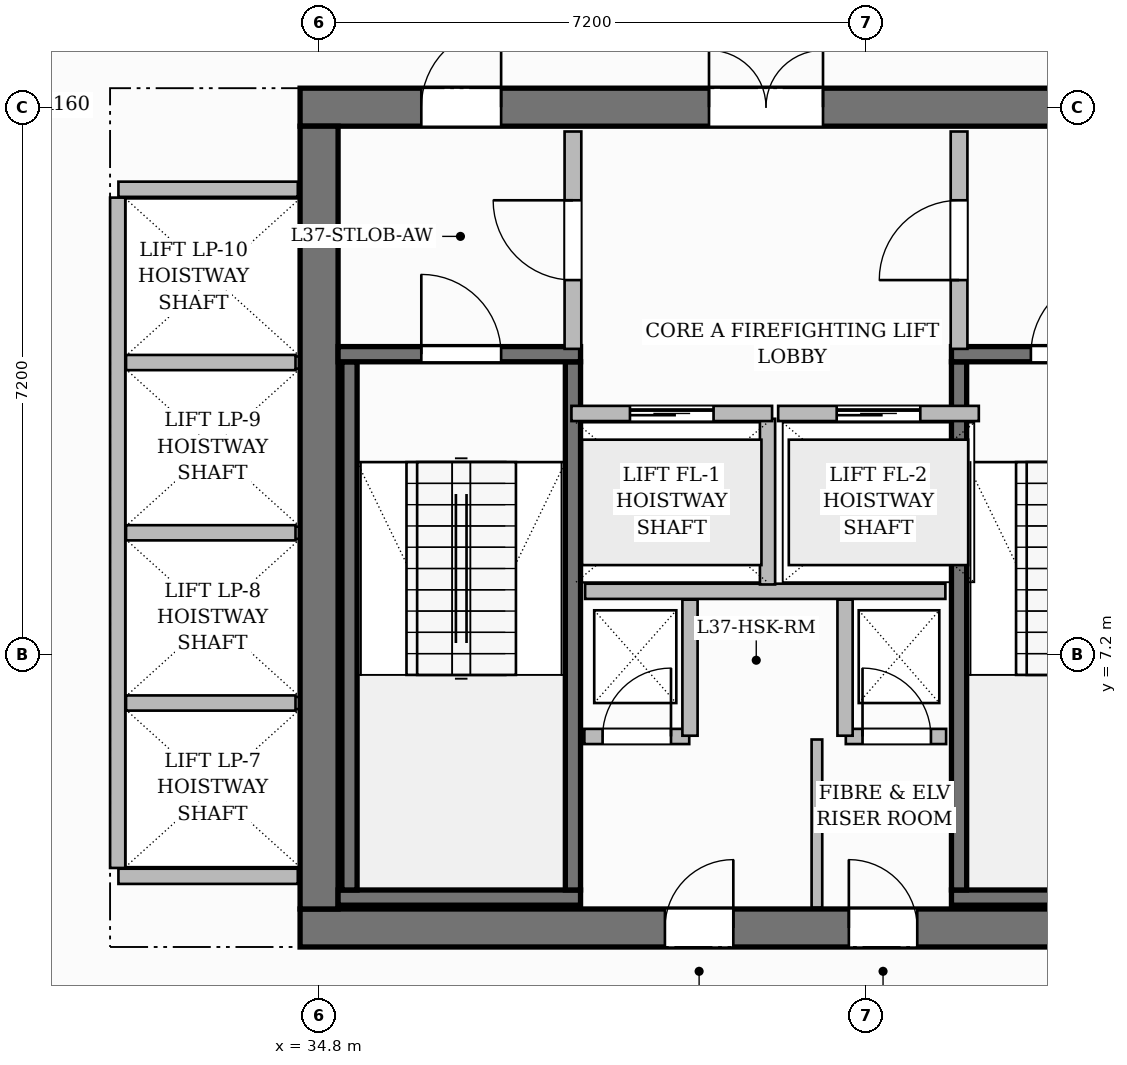
"""IFC4 building model, lengths in metres.
Left out: names, types, materials, properties, quantities, classifications, styles, units other than length and angle.
Written with IfcOpenShell. Run it as: python <this file> out.ifc"""

import sys

from ifc_helpers import new_model, si_unit, direction, frame, frame_2d, origin, place, context, subcontext, project, spatial, rectangle, extrude, source, transform, mapped, element, fill, save


model = new_model("IFC4")
c1 = context("Model", 3, precision=1e-05, world=origin(), true_north=direction((0.0, 1.0)))
c2 = subcontext(c1, "Body", "Model", "MODEL_VIEW")
j1 = project(units=[si_unit("LENGTHUNIT", "METRE"), si_unit("PLANEANGLEUNIT", "RADIAN")], contexts=[c1])
p1 = place(None, origin())
s1 = spatial("IfcSite", under=j1, at=p1, CompositionType="ELEMENT")
p2 = place(p1, origin())
s2 = spatial("IfcBuilding", under=s1, at=p2, CompositionType="ELEMENT")
p3 = place(p2, frame((0.0, 0.0, 150.3)))
s3 = spatial("IfcBuildingStorey", under=s2, at=p3, CompositionType="ELEMENT", Elevation=150.3)
p4 = place(p3, frame((34.55, 3.6, 0.0), z_axis=(0.0, 0.0, 1.0), x_axis=(1.0, 0.0, 0.0)))
e1 = element("IfcWall", 1, at=p4, inside=s3, PredefinedType="SHEAR", context=c2, shape_type="SweptSolid", body=[
    extrude(rectangle(XDim=15.5, YDim=0.5, at=frame_2d((7.75, 0.0))), origin(), (0.0, 0.0, 1.0), 3.85),
])
p5 = place(p4, frame((4.8, 0.0, 0.0)))
e2 = element("IfcOpeningElement", 2, at=p5, cuts=e1, PredefinedType="OPENING", context=c2, shape_type="SweptSolid", body=[
    extrude(rectangle(XDim=0.9, YDim=2.1, at=frame_2d((0.45, 1.05))), frame((0.0, 0.26, 0.0), z_axis=(0.0, -1.0, 0.0), x_axis=(1.0, 0.0, 0.0)), (0.0, 0.0, 1.0), 0.52),
])
p6 = place(p4, frame((7.22, 0.0, 0.0)))
e3 = element("IfcOpeningElement", 3, at=p6, cuts=e1, PredefinedType="OPENING", context=c2, shape_type="SweptSolid", body=[
    extrude(rectangle(XDim=0.9, YDim=2.1, at=frame_2d((0.45, 1.05))), frame((0.0, 0.26, 0.0), z_axis=(0.0, -1.0, 0.0), x_axis=(1.0, 0.0, 0.0)), (0.0, 0.0, 1.0), 0.52),
])
p7 = place(p3, frame((34.55, 14.4, 0.0), z_axis=(0.0, 0.0, 1.0), x_axis=(1.0, 0.0, 0.0)))
e4 = element("IfcWall", 4, at=p7, inside=s3, PredefinedType="SHEAR", context=c2, shape_type="SweptSolid", body=[
    extrude(rectangle(XDim=15.5, YDim=0.5, at=frame_2d((7.75, 0.0))), origin(), (0.0, 0.0, 1.0), 3.85),
])
p8 = place(p7, frame((5.38, 0.0, 0.0)))
e5 = element("IfcOpeningElement", 5, at=p8, cuts=e4, PredefinedType="OPENING", context=c2, shape_type="SweptSolid", body=[
    extrude(rectangle(XDim=1.5, YDim=2.2, at=frame_2d((0.75, 1.1))), frame((0.0, 0.26, 0.0), z_axis=(0.0, -1.0, 0.0), x_axis=(1.0, 0.0, 0.0)), (0.0, 0.0, 1.0), 0.52),
])
p9 = place(p7, frame((1.595, 0.0, 0.0)))
e6 = element("IfcOpeningElement", 6, at=p9, cuts=e4, PredefinedType="OPENING", context=c2, shape_type="SweptSolid", body=[
    extrude(rectangle(XDim=1.05, YDim=2.15, at=frame_2d((0.525, 1.075))), frame((0.0, 0.26, 0.0), z_axis=(0.0, -1.0, 0.0), x_axis=(1.0, 0.0, 0.0)), (0.0, 0.0, 1.0), 0.52),
])
p10 = place(p7, frame((11.225, 0.0, 0.0)))
e7 = element("IfcOpeningElement", 7, at=p10, cuts=e4, PredefinedType="OPENING", context=c2, shape_type="SweptSolid", body=[
    extrude(rectangle(XDim=1.05, YDim=2.15, at=frame_2d((0.525, 1.075))), frame((0.0, 0.26, 0.0), z_axis=(0.0, -1.0, 0.0), x_axis=(1.0, 0.0, 0.0)), (0.0, 0.0, 1.0), 0.52),
])
p11 = place(p3, frame((34.8, 3.85, 0.0), z_axis=(0.0, 0.0, 1.0), x_axis=(0.0, 1.0, 0.0)))
e8 = element("IfcWall", 8, at=p11, inside=s3, PredefinedType="SHEAR", context=c2, shape_type="SweptSolid", body=[
    extrude(rectangle(XDim=10.3, YDim=0.5, at=frame_2d((5.15, 0.0))), origin(), (0.0, 0.0, 1.0), 3.85),
])
p12 = place(p3, frame((35.05, 4.0, 0.0), z_axis=(0.0, 0.0, 1.0), x_axis=(1.0, 0.0, 0.0)))
e9 = element("IfcWall", 9, at=p12, inside=s3, PredefinedType="SHEAR", context=c2, shape_type="SweptSolid", body=[
    extrude(rectangle(XDim=3.19, YDim=0.2, at=frame_2d((1.595, 0.0))), origin(), (0.0, 0.0, 1.0), 3.85),
])
for number, where, z_axis, x_axis in (
    (10, (35.2, 4.1, 0.0), (0.0, 0.0, 1.0), (0.0, 1.0, 0.0)),
    (11, (38.14, 4.1, 0.0), (0.0, 0.0, 1.0), (0.0, 1.0, 0.0)),
):
    element("IfcWall", number, at=place(p3, frame(where, z_axis=z_axis, x_axis=x_axis)), inside=s3, PredefinedType="SHEAR", context=c2, shape_type="SweptSolid", body=[
        extrude(rectangle(XDim=6.95, YDim=0.2, at=frame_2d((3.475, 0.0))), origin(), (0.0, 0.0, 1.0), 3.85),
    ])
p13 = place(p3, frame((35.05, 11.15, 0.0), z_axis=(0.0, 0.0, 1.0), x_axis=(1.0, 0.0, 0.0)))
e12 = element("IfcWall", 12, at=p13, inside=s3, PredefinedType="SHEAR", context=c2, shape_type="SweptSolid", body=[
    extrude(rectangle(XDim=3.19, YDim=0.2, at=frame_2d((1.595, 0.0))), origin(), (0.0, 0.0, 1.0), 3.85),
])
p14 = place(p13, frame((1.095, 0.0, 0.0)))
e13 = element("IfcOpeningElement", 13, at=p14, cuts=e12, PredefinedType="OPENING", context=c2, shape_type="SweptSolid", body=[
    extrude(rectangle(XDim=1.05, YDim=2.2, at=frame_2d((0.525, 1.1))), frame((0.0, 0.11, 0.0), z_axis=(0.0, -1.0, 0.0), x_axis=(1.0, 0.0, 0.0)), (0.0, 0.0, 1.0), 0.22),
])
p15 = place(p3, frame((43.12, 4.0, 0.0), z_axis=(0.0, 0.0, 1.0), x_axis=(1.0, 0.0, 0.0)))
e14 = element("IfcWall", 14, at=p15, inside=s3, PredefinedType="SHEAR", context=c2, shape_type="SweptSolid", body=[
    extrude(rectangle(XDim=6.43, YDim=0.2, at=frame_2d((3.215, 0.0))), origin(), (0.0, 0.0, 1.0), 3.85),
])
p16 = place(p3, frame((43.22, 4.1, 0.0), z_axis=(0.0, 0.0, 1.0), x_axis=(0.0, 1.0, 0.0)))
e15 = element("IfcWall", 15, at=p16, inside=s3, PredefinedType="SHEAR", context=c2, shape_type="SweptSolid", body=[
    extrude(rectangle(XDim=6.95, YDim=0.2, at=frame_2d((3.475, 0.0))), origin(), (0.0, 0.0, 1.0), 3.85),
])
p17 = place(p3, frame((43.12, 11.15, 0.0), z_axis=(0.0, 0.0, 1.0), x_axis=(1.0, 0.0, 0.0)))
e16 = element("IfcWall", 16, at=p17, inside=s3, PredefinedType="SHEAR", context=c2, shape_type="SweptSolid", body=[
    extrude(rectangle(XDim=6.43, YDim=0.2, at=frame_2d((3.215, 0.0))), origin(), (0.0, 0.0, 1.0), 3.85),
])
p18 = place(p17, frame((1.045, 0.0, 0.0)))
e17 = element("IfcOpeningElement", 17, at=p18, cuts=e16, PredefinedType="OPENING", context=c2, shape_type="SweptSolid", body=[
    extrude(rectangle(XDim=1.05, YDim=2.2, at=frame_2d((0.525, 1.1))), frame((0.0, 0.11, 0.0), z_axis=(0.0, -1.0, 0.0), x_axis=(1.0, 0.0, 0.0)), (0.0, 0.0, 1.0), 0.22),
])
p19 = place(p17, frame((4.125, 0.0, 0.0)))
e18 = element("IfcOpeningElement", 18, at=p19, cuts=e16, PredefinedType="OPENING", context=c2, shape_type="SweptSolid", body=[
    extrude(rectangle(XDim=1.05, YDim=2.2, at=frame_2d((0.525, 1.1))), frame((0.0, 0.11, 0.0), z_axis=(0.0, -1.0, 0.0), x_axis=(1.0, 0.0, 0.0)), (0.0, 0.0, 1.0), 0.22),
])
p20 = place(p3, frame((38.3, 8.03, 0.0), z_axis=(0.0, 0.0, 1.0), x_axis=(1.0, 0.0, 0.0)))
e19 = element("IfcWall", 19, at=p20, inside=s3, PredefinedType="PARTITIONING", context=c2, shape_type="SweptSolid", body=[
    extrude(rectangle(XDim=4.74, YDim=0.2, at=frame_2d((2.37, 0.0))), origin(), (0.0, 0.0, 1.0), 3.6),
])
p21 = place(p3, frame((40.7, 8.12, 0.0), z_axis=(0.0, 0.0, 1.0), x_axis=(0.0, 1.0, 0.0)))
e20 = element("IfcWall", 20, at=p21, inside=s3, PredefinedType="PARTITIONING", context=c2, shape_type="SweptSolid", body=[
    extrude(rectangle(XDim=2.18, YDim=0.2, at=frame_2d((1.09, 0.0))), origin(), (0.0, 0.0, 1.0), 3.6),
])
p22 = place(p3, frame((38.14, 11.22, 0.0), z_axis=(0.0, 0.0, 1.0), x_axis=(0.0, 1.0, 0.0)))
e21 = element("IfcWall", 21, at=p22, inside=s3, PredefinedType="PARTITIONING", context=c2, shape_type="SweptSolid", body=[
    extrude(rectangle(XDim=2.86, YDim=0.22, at=frame_2d((1.43, 0.0))), origin(), (0.0, 0.0, 1.0), 3.6),
])
p23 = place(p22, frame((0.905, 0.0, 0.0)))
e22 = element("IfcOpeningElement", 22, at=p23, cuts=e21, PredefinedType="OPENING", context=c2, shape_type="SweptSolid", body=[
    extrude(rectangle(XDim=1.05, YDim=2.15, at=frame_2d((0.525, 1.075))), frame((0.0, 0.12, 0.0), z_axis=(0.0, -1.0, 0.0), x_axis=(1.0, 0.0, 0.0)), (0.0, 0.0, 1.0), 0.24),
])
p24 = place(p3, frame((43.22, 11.22, 0.0), z_axis=(0.0, 0.0, 1.0), x_axis=(0.0, 1.0, 0.0)))
e23 = element("IfcWall", 23, at=p24, inside=s3, PredefinedType="PARTITIONING", context=c2, shape_type="SweptSolid", body=[
    extrude(rectangle(XDim=2.86, YDim=0.22, at=frame_2d((1.43, 0.0))), origin(), (0.0, 0.0, 1.0), 3.6),
])
p25 = place(p24, frame((0.905, 0.0, 0.0)))
e24 = element("IfcOpeningElement", 24, at=p25, cuts=e23, PredefinedType="OPENING", context=c2, shape_type="SweptSolid", body=[
    extrude(rectangle(XDim=1.05, YDim=2.15, at=frame_2d((0.525, 1.075))), frame((0.0, 0.12, 0.0), z_axis=(0.0, -1.0, 0.0), x_axis=(1.0, 0.0, 0.0)), (0.0, 0.0, 1.0), 0.24),
])
p26 = place(p3, frame((38.29, 6.12, 0.0), z_axis=(0.0, 0.0, 1.0), x_axis=(1.0, 0.0, 0.0)))
e25 = element("IfcWall", 25, at=p26, inside=s3, PredefinedType="PARTITIONING", context=c2, shape_type="SweptSolid", body=[
    extrude(rectangle(XDim=1.38, YDim=0.2, at=frame_2d((0.69, 0.0))), origin(), (0.0, 0.0, 1.0), 3.6),
])
p27 = place(p26, frame((0.24, 0.0, 0.0)))
e26 = element("IfcOpeningElement", 26, at=p27, cuts=e25, PredefinedType="OPENING", context=c2, shape_type="SweptSolid", body=[
    extrude(rectangle(XDim=0.9, YDim=2.1, at=frame_2d((0.45, 1.05))), frame((0.0, 0.11, 0.0), z_axis=(0.0, -1.0, 0.0), x_axis=(1.0, 0.0, 0.0)), (0.0, 0.0, 1.0), 0.22),
])
p28 = place(p3, frame((39.68, 6.13, 0.0), z_axis=(0.0, 0.0, 1.0), x_axis=(0.0, 1.0, 0.0)))
e27 = element("IfcWall", 27, at=p28, inside=s3, PredefinedType="PARTITIONING", context=c2, shape_type="SweptSolid", body=[
    extrude(rectangle(XDim=1.79, YDim=0.2, at=frame_2d((0.895, 0.0))), origin(), (0.0, 0.0, 1.0), 3.6),
])
p29 = place(p3, frame((41.73, 6.12, 0.0), z_axis=(0.0, 0.0, 1.0), x_axis=(1.0, 0.0, 0.0)))
e28 = element("IfcWall", 28, at=p29, inside=s3, PredefinedType="PARTITIONING", context=c2, shape_type="SweptSolid", body=[
    extrude(rectangle(XDim=1.32, YDim=0.2, at=frame_2d((0.66, 0.0))), origin(), (0.0, 0.0, 1.0), 3.6),
])
p30 = place(p29, frame((0.22, 0.0, 0.0)))
e29 = element("IfcOpeningElement", 29, at=p30, cuts=e28, PredefinedType="OPENING", context=c2, shape_type="SweptSolid", body=[
    extrude(rectangle(XDim=0.9, YDim=2.1, at=frame_2d((0.45, 1.05))), frame((0.0, 0.11, 0.0), z_axis=(0.0, -1.0, 0.0), x_axis=(1.0, 0.0, 0.0)), (0.0, 0.0, 1.0), 0.22),
])
p31 = place(p3, frame((41.72, 6.13, 0.0), z_axis=(0.0, 0.0, 1.0), x_axis=(0.0, 1.0, 0.0)))
e30 = element("IfcWall", 30, at=p31, inside=s3, PredefinedType="PARTITIONING", context=c2, shape_type="SweptSolid", body=[
    extrude(rectangle(XDim=1.79, YDim=0.2, at=frame_2d((0.895, 0.0))), origin(), (0.0, 0.0, 1.0), 3.6),
])
p32 = place(p3, frame((41.35, 3.87, 0.0), z_axis=(0.0, 0.0, 1.0), x_axis=(0.0, 1.0, 0.0)))
e31 = element("IfcWall", 31, at=p32, inside=s3, PredefinedType="PARTITIONING", context=c2, shape_type="SweptSolid", body=[
    extrude(rectangle(XDim=2.21, YDim=0.14, at=frame_2d((1.105, 0.0))), origin(), (0.0, 0.0, 1.0), 3.6),
])
for number, where, z_axis, x_axis in (
    (32, (32.16, 4.28, 0.0), (0.0, 0.0, 1.0), (1.0, 0.0, 0.0)),
    (33, (32.16, 13.32, 0.0), (0.0, 0.0, 1.0), (1.0, 0.0, 0.0)),
):
    element("IfcWall", number, at=place(p3, frame(where, z_axis=z_axis, x_axis=x_axis)), inside=s3, PredefinedType="PARTITIONING", context=c2, shape_type="SweptSolid", body=[
        extrude(rectangle(XDim=2.36, YDim=0.2, at=frame_2d((1.18, 0.0))), origin(), (0.0, 0.0, 1.0), 3.6),
    ])
p33 = place(p3, frame((32.15, 4.39, 0.0), z_axis=(0.0, 0.0, 1.0), x_axis=(0.0, 1.0, 0.0)))
e34 = element("IfcWall", 34, at=p33, inside=s3, PredefinedType="PARTITIONING", context=c2, shape_type="SweptSolid", body=[
    extrude(rectangle(XDim=8.82, YDim=0.2, at=frame_2d((4.41, 0.0))), origin(), (0.0, 0.0, 1.0), 3.6),
])
for number, where, z_axis, x_axis in (
    (35, (32.26, 6.56, 0.0), (0.0, 0.0, 1.0), (1.0, 0.0, 0.0)),
    (36, (32.26, 8.8, 0.0), (0.0, 0.0, 1.0), (1.0, 0.0, 0.0)),
    (37, (32.26, 11.04, 0.0), (0.0, 0.0, 1.0), (1.0, 0.0, 0.0)),
):
    element("IfcWall", number, at=place(p3, frame(where, z_axis=z_axis, x_axis=x_axis)), inside=s3, PredefinedType="PARTITIONING", context=c2, shape_type="SweptSolid", body=[
        extrude(rectangle(XDim=2.23, YDim=0.2, at=frame_2d((1.115, 0.0))), origin(), (0.0, 0.0, 1.0), 3.6),
    ])
p34 = place(p3, frame((38.12, 10.37, 0.0), z_axis=(0.0, 0.0, 1.0), x_axis=(1.0, 0.0, 0.0)))
e38 = element("IfcWall", 38, at=p34, inside=s3, PredefinedType="PARTITIONING", context=c2, shape_type="SweptSolid", body=[
    extrude(rectangle(XDim=2.64, YDim=0.2, at=frame_2d((1.32, 0.0))), origin(), (0.0, 0.0, 1.0), 3.6),
])
p35 = place(p34, frame((0.77, 0.0, 0.0)))
e39 = element("IfcOpeningElement", 39, at=p35, cuts=e38, PredefinedType="OPENING", context=c2, shape_type="SweptSolid", body=[
    extrude(rectangle(XDim=1.1, YDim=2.2, at=frame_2d((0.55, 1.1))), frame((0.0, 0.11, 0.0), z_axis=(0.0, -1.0, 0.0), x_axis=(1.0, 0.0, 0.0)), (0.0, 0.0, 1.0), 0.22),
])
p36 = place(p3, frame((40.84, 10.37, 0.0), z_axis=(0.0, 0.0, 1.0), x_axis=(1.0, 0.0, 0.0)))
e40 = element("IfcWall", 40, at=p36, inside=s3, PredefinedType="PARTITIONING", context=c2, shape_type="SweptSolid", body=[
    extrude(rectangle(XDim=2.64, YDim=0.2, at=frame_2d((1.32, 0.0))), origin(), (0.0, 0.0, 1.0), 3.6),
])
p37 = place(p36, frame((0.77, 0.0, 0.0)))
e41 = element("IfcOpeningElement", 41, at=p37, cuts=e40, PredefinedType="OPENING", context=c2, shape_type="SweptSolid", body=[
    extrude(rectangle(XDim=1.1, YDim=2.2, at=frame_2d((0.55, 1.1))), frame((0.0, 0.11, 0.0), z_axis=(0.0, -1.0, 0.0), x_axis=(1.0, 0.0, 0.0)), (0.0, 0.0, 1.0), 0.22),
])
m1 = source(origin(), c2, "Body", "SweptSolid", [
    extrude(rectangle(XDim=1.05, YDim=2.2, at=frame_2d((0.525, 1.1))), frame((0.0, 0.025, 0.0), z_axis=(0.0, -1.0, 0.0), x_axis=(1.0, 0.0, 0.0)), (0.0, 0.0, 1.0), 0.05),
])
p38 = place(p14, origin())
e42 = element("IfcDoor", 42, at=p38, inside=s3, OperationType="SINGLE_SWING_LEFT", PredefinedType="DOOR", context=c2, shape_type="MappedRepresentation", body=[
    mapped(m1, transform((0.0, 0.0, 0.0), scale=1.0)),
])
fill(e13, e42)
p39 = place(p18, origin())
e43 = element("IfcDoor", 43, at=p39, inside=s3, OperationType="SINGLE_SWING_RIGHT", PredefinedType="DOOR", context=c2, shape_type="MappedRepresentation", body=[
    mapped(m1, transform((0.0, 0.0, 0.0), scale=1.0)),
])
fill(e17, e43)
m2 = source(origin(), c2, "Body", "SweptSolid", [
    extrude(rectangle(XDim=1.05, YDim=2.15, at=frame_2d((0.525, 1.075))), frame((0.0, 0.025, 0.0), z_axis=(0.0, -1.0, 0.0), x_axis=(1.0, 0.0, 0.0)), (0.0, 0.0, 1.0), 0.05),
])
p40 = place(p23, origin())
e44 = element("IfcDoor", 44, at=p40, inside=s3, OperationType="SINGLE_SWING_RIGHT", PredefinedType="DOOR", context=c2, shape_type="MappedRepresentation", body=[
    mapped(m2, transform((0.0, 0.0, 0.0), scale=1.0)),
])
fill(e22, e44)
p41 = place(p25, origin())
e45 = element("IfcDoor", 45, at=p41, inside=s3, OperationType="SINGLE_SWING_LEFT", PredefinedType="DOOR", context=c2, shape_type="MappedRepresentation", body=[
    mapped(m2, transform((0.0, 0.0, 0.0), scale=1.0)),
])
fill(e24, e45)
m3 = source(origin(), c2, "Body", "SweptSolid", [
    extrude(rectangle(XDim=1.5, YDim=2.2, at=frame_2d((0.75, 1.1))), frame((0.0, 0.025, 0.0), z_axis=(0.0, -1.0, 0.0), x_axis=(1.0, 0.0, 0.0)), (0.0, 0.0, 1.0), 0.05),
])
p42 = place(p8, origin())
e46 = element("IfcDoor", 46, at=p42, inside=s3, OperationType="DOUBLE_DOOR_SINGLE_SWING", PredefinedType="DOOR", context=c2, shape_type="MappedRepresentation", body=[
    mapped(m3, transform((0.0, 0.0, 0.0), scale=1.0)),
])
fill(e5, e46)
p43 = place(p9, origin())
e47 = element("IfcDoor", 47, at=p43, inside=s3, OperationType="SINGLE_SWING_RIGHT", PredefinedType="DOOR", context=c2, shape_type="MappedRepresentation", body=[
    mapped(m2, transform((0.0, 0.0, 0.0), scale=1.0)),
])
fill(e6, e47)
m4 = source(origin(), c2, "Body", "SweptSolid", [
    extrude(rectangle(XDim=0.9, YDim=2.1, at=frame_2d((0.45, 1.05))), frame((0.0, 0.025, 0.0), z_axis=(0.0, -1.0, 0.0), x_axis=(1.0, 0.0, 0.0)), (0.0, 0.0, 1.0), 0.05),
])
p44 = place(p27, origin())
e48 = element("IfcDoor", 48, at=p44, inside=s3, OperationType="SINGLE_SWING_RIGHT", PredefinedType="DOOR", context=c2, shape_type="MappedRepresentation", body=[
    mapped(m4, transform((0.0, 0.0, 0.0), scale=1.0)),
])
fill(e26, e48)
p45 = place(p30, origin())
e49 = element("IfcDoor", 49, at=p45, inside=s3, OperationType="SINGLE_SWING_LEFT", PredefinedType="DOOR", context=c2, shape_type="MappedRepresentation", body=[
    mapped(m4, transform((0.0, 0.0, 0.0), scale=1.0)),
])
fill(e29, e49)
p46 = place(p5, origin())
e50 = element("IfcDoor", 50, at=p46, inside=s3, OperationType="SINGLE_SWING_RIGHT", PredefinedType="DOOR", context=c2, shape_type="MappedRepresentation", body=[
    mapped(m4, transform((0.0, 0.0, 0.0), scale=1.0)),
])
fill(e2, e50)
p47 = place(p6, origin())
e51 = element("IfcDoor", 51, at=p47, inside=s3, OperationType="SINGLE_SWING_LEFT", PredefinedType="DOOR", context=c2, shape_type="MappedRepresentation", body=[
    mapped(m4, transform((0.0, 0.0, 0.0), scale=1.0)),
])
fill(e3, e51)
m5 = source(origin(), c2, "Body", "SweptSolid", [
    extrude(rectangle(XDim=1.1, YDim=2.2, at=frame_2d((0.55, 1.1))), frame((0.0, 0.025, 0.0), z_axis=(0.0, -1.0, 0.0), x_axis=(1.0, 0.0, 0.0)), (0.0, 0.0, 1.0), 0.05),
])
p48 = place(p35, origin())
e52 = element("IfcDoor", 52, at=p48, inside=s3, OperationType="SLIDING_TO_LEFT", PredefinedType="DOOR", context=c2, shape_type="MappedRepresentation", body=[
    mapped(m5, transform((0.0, 0.0, 0.0), scale=1.0)),
])
fill(e39, e52)
p49 = place(p37, origin())
e53 = element("IfcDoor", 53, at=p49, inside=s3, OperationType="SLIDING_TO_LEFT", PredefinedType="DOOR", context=c2, shape_type="MappedRepresentation", body=[
    mapped(m5, transform((0.0, 0.0, 0.0), scale=1.0)),
])
fill(e41, e53)
save(model, sys.argv[1])
